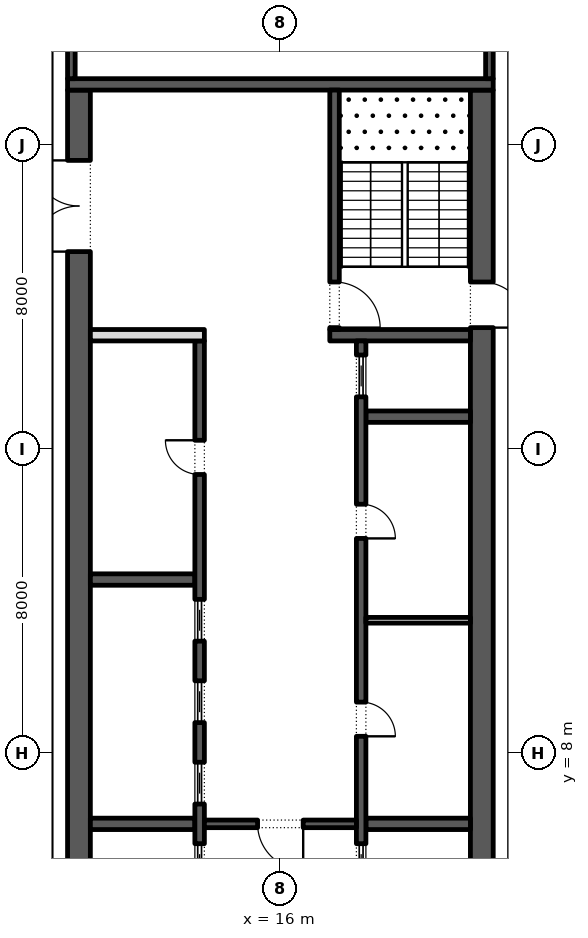
"""IFC4 building model, lengths in metres.
Left out: names, types, materials, properties, quantities, classifications, styles, units other than length and angle.
Written with IfcOpenShell. Run it as: python <this file> out.ifc"""

import sys

from ifc_helpers import new_model, si_unit, direction, frame, frame_2d, origin, place, context, subcontext, project, spatial, rectangle, extrude, element, fill, save


model = new_model("IFC4")
c1 = context("Model", 3, precision=1e-05, world=origin(), true_north=direction((0.0, 1.0)))
c2 = subcontext(c1, "Body", "Model", "MODEL_VIEW")
j1 = project(units=[si_unit("LENGTHUNIT", "METRE"), si_unit("PLANEANGLEUNIT", "RADIAN")], contexts=[c1])
p1 = place(None, origin())
s1 = spatial("IfcSite", under=j1, at=p1, CompositionType="ELEMENT")
p2 = place(p1, origin())
s2 = spatial("IfcBuilding", under=s1, at=p2, CompositionType="ELEMENT")
p3 = place(p2, frame((0.0, 0.0, 251.4)))
s3 = spatial("IfcBuildingStorey", under=s2, at=p3, CompositionType="ELEMENT", Elevation=251.4)
p4 = place(p3, frame((21.359, -11.678, 0.0), z_axis=(0.0, 0.0, 1.0), x_axis=(0.224949198343, 0.974370493275, 0.0)))
e1 = element("IfcWall", 1, at=p4, inside=s3, PredefinedType="STANDARD", context=c2, shape_type="SweptSolid", body=[
    extrude(rectangle(XDim=49.5, YDim=0.3, at=frame_2d((24.75, 0.0))), origin(), (0.0, 0.0, 1.0), 4.0),
])
p5 = place(p4, frame((1.157, 0.0, 0.45)))
e2 = element("IfcOpeningElement", 2, at=p5, cuts=e1, PredefinedType="OPENING", context=c2, shape_type="SweptSolid", body=[
    extrude(rectangle(XDim=4.5, YDim=3.05, at=frame_2d((2.25, 1.525))), frame((0.0, 0.16, 0.0), z_axis=(0.0, -1.0, 0.0), x_axis=(1.0, 0.0, 0.0)), (0.0, 0.0, 1.0), 0.32),
])
p6 = place(p4, frame((8.121, 0.0, 0.45)))
e3 = element("IfcOpeningElement", 3, at=p6, cuts=e1, PredefinedType="OPENING", context=c2, shape_type="SweptSolid", body=[
    extrude(rectangle(XDim=4.5, YDim=3.05, at=frame_2d((2.25, 1.525))), frame((0.0, 0.16, 0.0), z_axis=(0.0, -1.0, 0.0), x_axis=(1.0, 0.0, 0.0)), (0.0, 0.0, 1.0), 0.32),
])
p7 = place(p4, frame((15.236, 0.0, 0.45)))
e4 = element("IfcOpeningElement", 4, at=p7, cuts=e1, PredefinedType="OPENING", context=c2, shape_type="SweptSolid", body=[
    extrude(rectangle(XDim=4.5, YDim=3.05, at=frame_2d((2.25, 1.525))), frame((0.0, 0.16, 0.0), z_axis=(0.0, -1.0, 0.0), x_axis=(1.0, 0.0, 0.0)), (0.0, 0.0, 1.0), 0.32),
])
p8 = place(p4, frame((22.35, 0.0, 0.45)))
e5 = element("IfcOpeningElement", 5, at=p8, cuts=e1, PredefinedType="OPENING", context=c2, shape_type="SweptSolid", body=[
    extrude(rectangle(XDim=4.5, YDim=3.05, at=frame_2d((2.25, 1.525))), frame((0.0, 0.16, 0.0), z_axis=(0.0, -1.0, 0.0), x_axis=(1.0, 0.0, 0.0)), (0.0, 0.0, 1.0), 0.32),
])
p9 = place(p4, frame((29.464, 0.0, 0.45)))
e6 = element("IfcOpeningElement", 6, at=p9, cuts=e1, PredefinedType="OPENING", context=c2, shape_type="SweptSolid", body=[
    extrude(rectangle(XDim=4.5, YDim=2.95, at=frame_2d((2.25, 1.475))), frame((0.0, 0.16, 0.0), z_axis=(0.0, -1.0, 0.0), x_axis=(1.0, 0.0, 0.0)), (0.0, 0.0, 1.0), 0.32),
])
p10 = place(p4, frame((37.628, 0.0, 0.0)))
e7 = element("IfcOpeningElement", 7, at=p10, cuts=e1, PredefinedType="OPENING", context=c2, shape_type="SweptSolid", body=[
    extrude(rectangle(XDim=2.4, YDim=3.325, at=frame_2d((1.2, 1.663))), frame((0.0, 0.16, 0.0), z_axis=(0.0, -1.0, 0.0), x_axis=(1.0, 0.0, 0.0)), (0.0, 0.0, 1.0), 0.32),
])
p11 = place(p4, frame((43.693, 0.0, 0.45)))
e8 = element("IfcOpeningElement", 8, at=p11, cuts=e1, PredefinedType="OPENING", context=c2, shape_type="SweptSolid", body=[
    extrude(rectangle(XDim=4.5, YDim=3.05, at=frame_2d((2.25, 1.525))), frame((0.0, 0.16, 0.0), z_axis=(0.0, -1.0, 0.0), x_axis=(1.0, 0.0, 0.0)), (0.0, 0.0, 1.0), 0.32),
])
p12 = place(p3, frame((21.3, -2.45, 0.0), z_axis=(0.0, 0.0, 1.0), x_axis=(0.0, 1.0, 0.0)))
e9 = element("IfcWall", 9, at=p12, inside=s3, PredefinedType="SHEAR", context=c2, shape_type="SweptSolid", body=[
    extrude(rectangle(XDim=27.9, YDim=0.6, at=frame_2d((13.95, 0.0))), origin(), (0.0, 0.0, 1.0), 4.0),
])
p13 = place(p12, frame((5.05, 0.0, 0.0)))
e10 = element("IfcOpeningElement", 10, at=p13, cuts=e9, PredefinedType="OPENING", context=c2, shape_type="SweptSolid", body=[
    extrude(rectangle(XDim=1.2, YDim=2.1, at=frame_2d((0.6, 1.05))), frame((0.0, 0.31, 0.0), z_axis=(0.0, -1.0, 0.0), x_axis=(1.0, 0.0, 0.0)), (0.0, 0.0, 1.0), 0.62),
])
p14 = place(p12, frame((21.65, 0.0, 0.0)))
e11 = element("IfcOpeningElement", 11, at=p14, cuts=e9, PredefinedType="OPENING", context=c2, shape_type="SweptSolid", body=[
    extrude(rectangle(XDim=1.2, YDim=2.1, at=frame_2d((0.6, 1.05))), frame((0.0, 0.31, 0.0), z_axis=(0.0, -1.0, 0.0), x_axis=(1.0, 0.0, 0.0)), (0.0, 0.0, 1.0), 0.62),
])
p15 = place(p3, frame((10.7, -2.45, 0.0), z_axis=(0.0, 0.0, 1.0), x_axis=(0.0, 1.0, 0.0)))
e12 = element("IfcWall", 12, at=p15, inside=s3, PredefinedType="SHEAR", context=c2, shape_type="SweptSolid", body=[
    extrude(rectangle(XDim=27.9, YDim=0.6, at=frame_2d((13.95, 0.0))), origin(), (0.0, 0.0, 1.0), 4.0),
])
p16 = place(p15, frame((23.65, 0.0, 0.0)))
e13 = element("IfcOpeningElement", 13, at=p16, cuts=e12, PredefinedType="OPENING", context=c2, shape_type="SweptSolid", body=[
    extrude(rectangle(XDim=2.4, YDim=2.1, at=frame_2d((1.2, 1.05))), frame((0.0, 0.31, 0.0), z_axis=(0.0, -1.0, 0.0), x_axis=(1.0, 0.0, 0.0)), (0.0, 0.0, 1.0), 0.62),
])
p17 = place(p15, frame((0.788, 0.0, 0.0)))
e14 = element("IfcOpeningElement", 14, at=p17, cuts=e12, PredefinedType="OPENING", context=c2, shape_type="SweptSolid", body=[
    extrude(rectangle(XDim=0.9, YDim=2.1, at=frame_2d((0.45, 1.05))), frame((0.0, 0.31, 0.0), z_axis=(0.0, -1.0, 0.0), x_axis=(1.0, 0.0, 0.0)), (0.0, 0.0, 1.0), 0.62),
])
p18 = place(p15, frame((3.962, 0.0, 0.0)))
e15 = element("IfcOpeningElement", 15, at=p18, cuts=e12, PredefinedType="OPENING", context=c2, shape_type="SweptSolid", body=[
    extrude(rectangle(XDim=1.0, YDim=2.1, at=frame_2d((0.5, 1.05))), frame((0.0, 0.31, 0.0), z_axis=(0.0, -1.0, 0.0), x_axis=(1.0, 0.0, 0.0)), (0.0, 0.0, 1.0), 0.62),
])
p19 = place(p3, frame((10.4, 25.6, 0.0), z_axis=(0.0, 0.0, 1.0), x_axis=(1.0, 0.0, 0.0)))
e16 = element("IfcWall", 16, at=p19, inside=s3, PredefinedType="SHEAR", context=c2, shape_type="SweptSolid", body=[
    extrude(rectangle(XDim=11.2, YDim=0.3, at=frame_2d((5.6, 0.0))), origin(), (0.0, 0.0, 1.0), 4.0),
])
p20 = place(p3, frame((17.3, 19.0, 0.0), z_axis=(0.0, 0.0, 1.0), x_axis=(1.0, 0.0, 0.0)))
e17 = element("IfcWall", 17, at=p20, inside=s3, PredefinedType="SHEAR", context=c2, shape_type="SweptSolid", body=[
    extrude(rectangle(XDim=3.7, YDim=0.3, at=frame_2d((1.85, 0.0))), origin(), (0.0, 0.0, 1.0), 4.0),
])
p21 = place(p3, frame((17.425, 19.15, 0.0), z_axis=(0.0, 0.0, 1.0), x_axis=(0.0, 1.0, 0.0)))
e18 = element("IfcWall", 18, at=p21, inside=s3, PredefinedType="SHEAR", context=c2, shape_type="SweptSolid", body=[
    extrude(rectangle(XDim=6.3, YDim=0.25, at=frame_2d((3.15, 0.0))), origin(), (0.0, 0.0, 1.0), 4.0),
])
p22 = place(p21, frame((0.05, 0.0, 0.0)))
e19 = element("IfcOpeningElement", 19, at=p22, cuts=e18, PredefinedType="OPENING", context=c2, shape_type="SweptSolid", body=[
    extrude(rectangle(XDim=1.2, YDim=2.1, at=frame_2d((0.6, 1.05))), frame((0.0, 0.135, 0.0), z_axis=(0.0, -1.0, 0.0), x_axis=(1.0, 0.0, 0.0)), (0.0, 0.0, 1.0), 0.27),
])
for number, where, z_axis, x_axis in (
    (20, (18.25, 6.143, 0.0), (0.0, 0.0, 1.0), (1.0, 0.0, 0.0)),
    (21, (18.25, 16.857, 0.0), (0.0, 0.0, 1.0), (1.0, 0.0, 0.0)),
):
    element("IfcWall", number, at=place(p3, frame(where, z_axis=z_axis, x_axis=x_axis)), inside=s3, PredefinedType="SHEAR", context=c2, shape_type="SweptSolid", body=[
        extrude(rectangle(XDim=2.75, YDim=0.3, at=frame_2d((1.375, 0.0))), origin(), (0.0, 0.0, 1.0), 4.0),
    ])
p23 = place(p3, frame((18.125, 4.15, 0.0), z_axis=(0.0, 0.0, 1.0), x_axis=(0.0, 1.0, 0.0)))
e22 = element("IfcWall", 22, at=p23, inside=s3, PredefinedType="SHEAR", context=c2, shape_type="SweptSolid", body=[
    extrude(rectangle(XDim=14.7, YDim=0.25, at=frame_2d((7.35, 0.0))), origin(), (0.0, 0.0, 1.0), 4.0),
])
p24 = place(p23, frame((4.296, 0.0, 0.0)))
e23 = element("IfcOpeningElement", 23, at=p24, cuts=e22, PredefinedType="OPENING", context=c2, shape_type="SweptSolid", body=[
    extrude(rectangle(XDim=0.9, YDim=2.1, at=frame_2d((0.45, 1.05))), frame((0.0, 0.135, 0.0), z_axis=(0.0, -1.0, 0.0), x_axis=(1.0, 0.0, 0.0)), (0.0, 0.0, 1.0), 0.27),
])
p25 = place(p23, frame((9.504, 0.0, 0.0)))
e24 = element("IfcOpeningElement", 24, at=p25, cuts=e22, PredefinedType="OPENING", context=c2, shape_type="SweptSolid", body=[
    extrude(rectangle(XDim=0.9, YDim=2.1, at=frame_2d((0.45, 1.05))), frame((0.0, 0.135, 0.0), z_axis=(0.0, -1.0, 0.0), x_axis=(1.0, 0.0, 0.0)), (0.0, 0.0, 1.0), 0.27),
])
p26 = place(p23, frame((0.371, 0.0, 0.0)))
e25 = element("IfcOpeningElement", 25, at=p26, cuts=e22, PredefinedType="OPENING", context=c2, shape_type="SweptSolid", body=[
    extrude(rectangle(XDim=1.1, YDim=2.1, at=frame_2d((0.55, 1.05))), frame((0.0, 0.135, 0.0), z_axis=(0.0, -1.0, 0.0), x_axis=(1.0, 0.0, 0.0)), (0.0, 0.0, 1.0), 0.27),
])
p27 = place(p23, frame((13.229, 0.0, 0.0)))
e26 = element("IfcOpeningElement", 26, at=p27, cuts=e22, PredefinedType="OPENING", context=c2, shape_type="SweptSolid", body=[
    extrude(rectangle(XDim=1.1, YDim=2.1, at=frame_2d((0.55, 1.05))), frame((0.0, 0.135, 0.0), z_axis=(0.0, -1.0, 0.0), x_axis=(1.0, 0.0, 0.0)), (0.0, 0.0, 1.0), 0.27),
])
p28 = place(p3, frame((18.25, 11.5, 0.0), z_axis=(0.0, 0.0, 1.0), x_axis=(1.0, 0.0, 0.0)))
e27 = element("IfcWall", 27, at=p28, inside=s3, PredefinedType="PARTITIONING", context=c2, shape_type="SweptSolid", body=[
    extrude(rectangle(XDim=2.75, YDim=0.15, at=frame_2d((1.375, 0.0))), origin(), (0.0, 0.0, 1.0), 4.0),
])
for number, where, z_axis, x_axis in (
    (28, (11.0, 6.143, 0.0), (0.0, 0.0, 1.0), (1.0, 0.0, 0.0)),
    (29, (11.0, 12.571, 0.0), (0.0, 0.0, 1.0), (1.0, 0.0, 0.0)),
):
    element("IfcWall", number, at=place(p3, frame(where, z_axis=z_axis, x_axis=x_axis)), inside=s3, PredefinedType="SHEAR", context=c2, shape_type="SweptSolid", body=[
        extrude(rectangle(XDim=2.75, YDim=0.3, at=frame_2d((1.375, 0.0))), origin(), (0.0, 0.0, 1.0), 4.0),
    ])
p29 = place(p3, frame((13.875, -2.45, 0.0), z_axis=(0.0, 0.0, 1.0), x_axis=(0.0, 1.0, 0.0)))
e30 = element("IfcWall", 30, at=p29, inside=s3, PredefinedType="SHEAR", context=c2, shape_type="SweptSolid", body=[
    extrude(rectangle(XDim=21.3, YDim=0.25, at=frame_2d((10.65, 0.0))), origin(), (0.0, 0.0, 1.0), 4.0),
])
p30 = place(p29, frame((17.786, 0.0, 0.0)))
e31 = element("IfcOpeningElement", 31, at=p30, cuts=e30, PredefinedType="OPENING", context=c2, shape_type="SweptSolid", body=[
    extrude(rectangle(XDim=0.9, YDim=2.1, at=frame_2d((0.45, 1.05))), frame((0.0, 0.135, 0.0), z_axis=(0.0, -1.0, 0.0), x_axis=(1.0, 0.0, 0.0)), (0.0, 0.0, 1.0), 0.27),
])
p31 = place(p29, frame((6.971, 0.0, 0.0)))
e32 = element("IfcOpeningElement", 32, at=p31, cuts=e30, PredefinedType="OPENING", context=c2, shape_type="SweptSolid", body=[
    extrude(rectangle(XDim=1.1, YDim=2.1, at=frame_2d((0.55, 1.05))), frame((0.0, 0.135, 0.0), z_axis=(0.0, -1.0, 0.0), x_axis=(1.0, 0.0, 0.0)), (0.0, 0.0, 1.0), 0.27),
])
p32 = place(p29, frame((9.114, 0.0, 0.0)))
e33 = element("IfcOpeningElement", 33, at=p32, cuts=e30, PredefinedType="OPENING", context=c2, shape_type="SweptSolid", body=[
    extrude(rectangle(XDim=1.1, YDim=2.1, at=frame_2d((0.55, 1.05))), frame((0.0, 0.135, 0.0), z_axis=(0.0, -1.0, 0.0), x_axis=(1.0, 0.0, 0.0)), (0.0, 0.0, 1.0), 0.27),
])
p33 = place(p29, frame((11.257, 0.0, 0.0)))
e34 = element("IfcOpeningElement", 34, at=p33, cuts=e30, PredefinedType="OPENING", context=c2, shape_type="SweptSolid", body=[
    extrude(rectangle(XDim=1.1, YDim=2.1, at=frame_2d((0.55, 1.05))), frame((0.0, 0.135, 0.0), z_axis=(0.0, -1.0, 0.0), x_axis=(1.0, 0.0, 0.0)), (0.0, 0.0, 1.0), 0.27),
])
p34 = place(p29, frame((13.4, 0.0, 0.0)))
e35 = element("IfcOpeningElement", 35, at=p34, cuts=e30, PredefinedType="OPENING", context=c2, shape_type="SweptSolid", body=[
    extrude(rectangle(XDim=1.1, YDim=2.1, at=frame_2d((0.55, 1.05))), frame((0.0, 0.135, 0.0), z_axis=(0.0, -1.0, 0.0), x_axis=(1.0, 0.0, 0.0)), (0.0, 0.0, 1.0), 0.27),
])
p35 = place(p3, frame((11.0, 19.0, 0.0), z_axis=(0.0, 0.0, 1.0), x_axis=(1.0, 0.0, 0.0)))
e36 = element("IfcWall", 36, at=p35, inside=s3, PredefinedType="PARTITIONING", context=c2, shape_type="SweptSolid", body=[
    extrude(rectangle(XDim=3.0, YDim=0.3, at=frame_2d((1.5, 0.0))), origin(), (0.0, 0.0, 1.0), 4.0),
])
p36 = place(p3, frame((14.0, 6.143, 0.0), z_axis=(0.0, 0.0, 1.0), x_axis=(1.0, 0.0, 0.0)))
e37 = element("IfcWall", 37, at=p36, inside=s3, PredefinedType="SHEAR", context=c2, shape_type="SweptSolid", body=[
    extrude(rectangle(XDim=4.0, YDim=0.2, at=frame_2d((2.0, 0.0))), origin(), (0.0, 0.0, 1.0), 4.0),
])
p37 = place(p36, frame((1.4, 0.0, 0.0)))
e38 = element("IfcOpeningElement", 38, at=p37, cuts=e37, PredefinedType="OPENING", context=c2, shape_type="SweptSolid", body=[
    extrude(rectangle(XDim=1.2, YDim=2.1, at=frame_2d((0.6, 1.05))), frame((0.0, 0.11, 0.0), z_axis=(0.0, -1.0, 0.0), x_axis=(1.0, 0.0, 0.0)), (0.0, 0.0, 1.0), 0.22),
])
p38 = place(p3, frame((21.5, 25.75, 0.0), z_axis=(0.0, 0.0, 1.0), x_axis=(0.0, 1.0, 0.0)))
e39 = element("IfcWall", 39, at=p38, inside=s3, PredefinedType="SHEAR", context=c2, shape_type="SweptSolid", body=[
    extrude(rectangle(XDim=4.75, YDim=0.2, at=frame_2d((2.375, 0.0))), origin(), (0.0, 0.0, 1.0), 4.0),
])
p39 = place(p3, frame((10.5, 25.75, 0.0), z_axis=(0.0, 0.0, 1.0), x_axis=(0.0, 1.0, 0.0)))
e40 = element("IfcWall", 40, at=p39, inside=s3, PredefinedType="SHEAR", context=c2, shape_type="SweptSolid", body=[
    extrude(rectangle(XDim=4.75, YDim=0.2, at=frame_2d((2.375, 0.0))), origin(), (0.0, 0.0, 1.0), 4.0),
])
p40 = place(p39, frame((1.925, 0.0, 0.0)))
e41 = element("IfcOpeningElement", 41, at=p40, cuts=e40, PredefinedType="OPENING", context=c2, shape_type="SweptSolid", body=[
    extrude(rectangle(XDim=0.9, YDim=2.1, at=frame_2d((0.45, 1.05))), frame((0.0, 0.11, 0.0), z_axis=(0.0, -1.0, 0.0), x_axis=(1.0, 0.0, 0.0)), (0.0, 0.0, 1.0), 0.22),
])
p41 = place(p24, frame((0.9, -0.2, 0.0), z_axis=(0.0, 0.0, 1.0), x_axis=(-1.0, 0.0, 0.0)))
e42 = element("IfcDoor", 42, at=p41, inside=s3, OperationType="SINGLE_SWING_LEFT", PredefinedType="DOOR", context=c2, shape_type="SweptSolid", body=[
    extrude(rectangle(XDim=0.9, YDim=2.1, at=frame_2d((0.45, 1.05))), frame((0.0, -0.075, 0.0), z_axis=(0.0, -1.0, 0.0), x_axis=(1.0, 0.0, 0.0)), (0.0, 0.0, 1.0), 0.05),
])
fill(e23, e42)
p42 = place(p25, frame((0.9, -0.2, 0.0), z_axis=(0.0, 0.0, 1.0), x_axis=(-1.0, 0.0, 0.0)))
e43 = element("IfcDoor", 43, at=p42, inside=s3, OperationType="SINGLE_SWING_LEFT", PredefinedType="DOOR", context=c2, shape_type="SweptSolid", body=[
    extrude(rectangle(XDim=0.9, YDim=2.1, at=frame_2d((0.45, 1.05))), frame((0.0, -0.075, 0.0), z_axis=(0.0, -1.0, 0.0), x_axis=(1.0, 0.0, 0.0)), (0.0, 0.0, 1.0), 0.05),
])
fill(e24, e43)
p43 = place(p26, origin())
e44 = element("IfcDoor", 44, at=p43, inside=s3, OperationType="SLIDING_TO_LEFT", PredefinedType="DOOR", context=c2, shape_type="SweptSolid", body=[
    extrude(rectangle(XDim=1.1, YDim=2.1, at=frame_2d((0.55, 1.05))), frame((0.0, 0.025, 0.0), z_axis=(0.0, -1.0, 0.0), x_axis=(1.0, 0.0, 0.0)), (0.0, 0.0, 1.0), 0.05),
])
fill(e25, e44)
p44 = place(p27, origin())
e45 = element("IfcDoor", 45, at=p44, inside=s3, OperationType="SLIDING_TO_LEFT", PredefinedType="DOOR", context=c2, shape_type="SweptSolid", body=[
    extrude(rectangle(XDim=1.1, YDim=2.1, at=frame_2d((0.55, 1.05))), frame((0.0, 0.025, 0.0), z_axis=(0.0, -1.0, 0.0), x_axis=(1.0, 0.0, 0.0)), (0.0, 0.0, 1.0), 0.05),
])
fill(e26, e45)
p45 = place(p30, origin())
e46 = element("IfcDoor", 46, at=p45, inside=s3, OperationType="SINGLE_SWING_LEFT", PredefinedType="DOOR", context=c2, shape_type="SweptSolid", body=[
    extrude(rectangle(XDim=0.9, YDim=2.1, at=frame_2d((0.45, 1.05))), frame((0.0, 0.125, 0.0), z_axis=(0.0, -1.0, 0.0), x_axis=(1.0, 0.0, 0.0)), (0.0, 0.0, 1.0), 0.05),
])
fill(e31, e46)
p46 = place(p31, origin())
e47 = element("IfcDoor", 47, at=p46, inside=s3, OperationType="SLIDING_TO_LEFT", PredefinedType="DOOR", context=c2, shape_type="SweptSolid", body=[
    extrude(rectangle(XDim=1.1, YDim=2.1, at=frame_2d((0.55, 1.05))), frame((0.0, 0.025, 0.0), z_axis=(0.0, -1.0, 0.0), x_axis=(1.0, 0.0, 0.0)), (0.0, 0.0, 1.0), 0.05),
])
fill(e32, e47)
p47 = place(p32, origin())
e48 = element("IfcDoor", 48, at=p47, inside=s3, OperationType="SLIDING_TO_LEFT", PredefinedType="DOOR", context=c2, shape_type="SweptSolid", body=[
    extrude(rectangle(XDim=1.1, YDim=2.1, at=frame_2d((0.55, 1.05))), frame((0.0, 0.025, 0.0), z_axis=(0.0, -1.0, 0.0), x_axis=(1.0, 0.0, 0.0)), (0.0, 0.0, 1.0), 0.05),
])
fill(e33, e48)
p48 = place(p33, origin())
e49 = element("IfcDoor", 49, at=p48, inside=s3, OperationType="SLIDING_TO_LEFT", PredefinedType="DOOR", context=c2, shape_type="SweptSolid", body=[
    extrude(rectangle(XDim=1.1, YDim=2.1, at=frame_2d((0.55, 1.05))), frame((0.0, 0.025, 0.0), z_axis=(0.0, -1.0, 0.0), x_axis=(1.0, 0.0, 0.0)), (0.0, 0.0, 1.0), 0.05),
])
fill(e34, e49)
p49 = place(p34, origin())
e50 = element("IfcDoor", 50, at=p49, inside=s3, OperationType="SLIDING_TO_LEFT", PredefinedType="DOOR", context=c2, shape_type="SweptSolid", body=[
    extrude(rectangle(XDim=1.1, YDim=2.1, at=frame_2d((0.55, 1.05))), frame((0.0, 0.025, 0.0), z_axis=(0.0, -1.0, 0.0), x_axis=(1.0, 0.0, 0.0)), (0.0, 0.0, 1.0), 0.05),
])
fill(e35, e50)
p50 = place(p37, frame((1.2, 0.0, 0.0), z_axis=(0.0, 0.0, 1.0), x_axis=(-1.0, 0.0, 0.0)))
e51 = element("IfcDoor", 51, at=p50, inside=s3, OperationType="SINGLE_SWING_RIGHT", PredefinedType="DOOR", context=c2, shape_type="SweptSolid", body=[
    extrude(rectangle(XDim=1.2, YDim=2.1, at=frame_2d((0.6, 1.05))), frame((0.0, 0.025, 0.0), z_axis=(0.0, -1.0, 0.0), x_axis=(1.0, 0.0, 0.0)), (0.0, 0.0, 1.0), 0.05),
])
fill(e38, e51)
p51 = place(p16, origin())
e52 = element("IfcDoor", 52, at=p51, inside=s3, OperationType="DOUBLE_DOOR_SINGLE_SWING", PredefinedType="DOOR", context=c2, shape_type="SweptSolid", body=[
    extrude(rectangle(XDim=2.4, YDim=2.1, at=frame_2d((1.2, 1.05))), frame((0.0, 0.025, 0.0), z_axis=(0.0, -1.0, 0.0), x_axis=(1.0, 0.0, 0.0)), (0.0, 0.0, 1.0), 0.05),
])
fill(e13, e52)
p52 = place(p22, frame((1.2, 0.0, 0.0), z_axis=(0.0, 0.0, 1.0), x_axis=(-1.0, 0.0, 0.0)))
e53 = element("IfcDoor", 53, at=p52, inside=s3, OperationType="SINGLE_SWING_LEFT", PredefinedType="DOOR", context=c2, shape_type="SweptSolid", body=[
    extrude(rectangle(XDim=1.2, YDim=2.1, at=frame_2d((0.6, 1.05))), frame((0.0, 0.025, 0.0), z_axis=(0.0, -1.0, 0.0), x_axis=(1.0, 0.0, 0.0)), (0.0, 0.0, 1.0), 0.05),
])
fill(e19, e53)
p53 = place(p14, frame((1.2, 0.0, 0.0), z_axis=(0.0, 0.0, 1.0), x_axis=(-1.0, 0.0, 0.0)))
e54 = element("IfcDoor", 54, at=p53, inside=s3, OperationType="SINGLE_SWING_LEFT", PredefinedType="DOOR", context=c2, shape_type="SweptSolid", body=[
    extrude(rectangle(XDim=1.2, YDim=2.1, at=frame_2d((0.6, 1.05))), frame((0.0, 0.025, 0.0), z_axis=(0.0, -1.0, 0.0), x_axis=(1.0, 0.0, 0.0)), (0.0, 0.0, 1.0), 0.05),
])
fill(e11, e54)
save(model, sys.argv[1])
